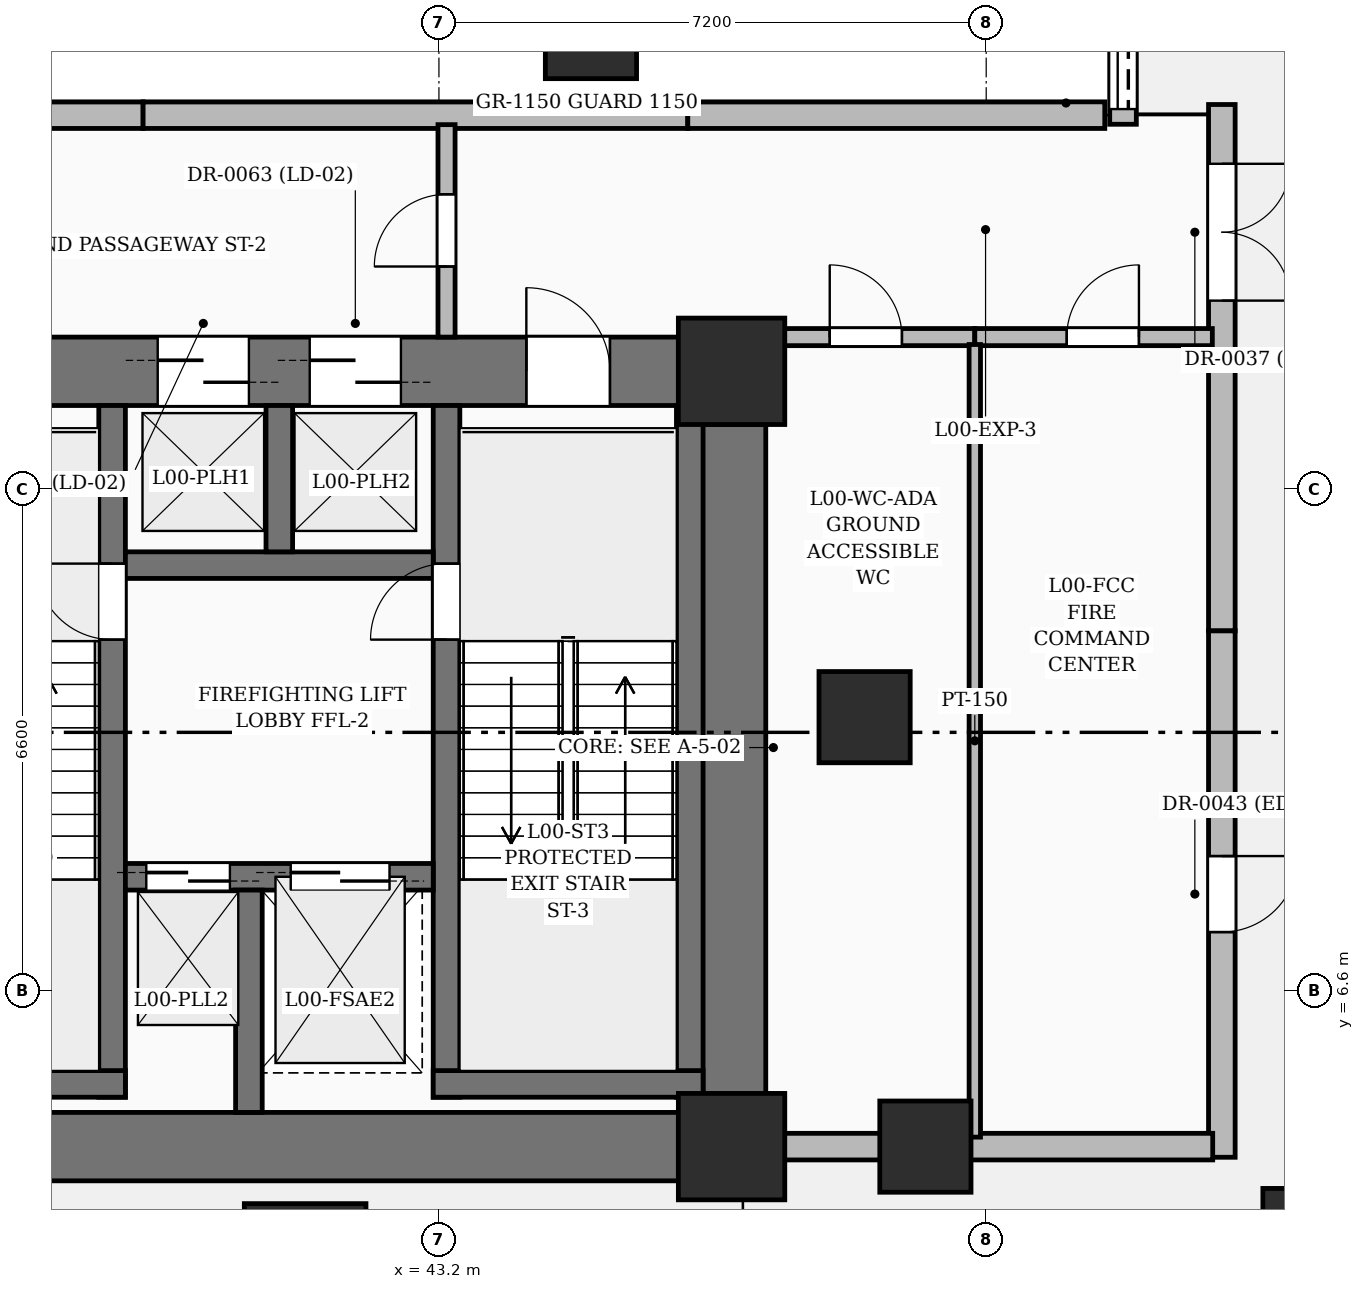
"""IFC4 building model, lengths in metres.
Left out: names, types, materials, properties, quantities, classifications, styles, units other than length and angle.
Written with IfcOpenShell. Run it as: python <this file> out.ifc"""

import sys

from ifc_helpers import new_model, si_unit, direction, frame, frame_2d, origin, origin_2d, place, context, subcontext, project, spatial, rectangle, circle, extrude, element, fill, save


model = new_model("IFC4")
c1 = context("Model", 3, precision=1e-05, world=origin(), true_north=direction((0.0, 1.0)))
c2 = subcontext(c1, "Body", "Model", "MODEL_VIEW")
j1 = project(units=[si_unit("LENGTHUNIT", "METRE"), si_unit("PLANEANGLEUNIT", "RADIAN")], contexts=[c1])
p1 = place(None, origin())
s1 = spatial("IfcSite", under=j1, at=p1, CompositionType="ELEMENT")
p2 = place(p1, origin())
s2 = spatial("IfcBuilding", under=s1, at=p2, CompositionType="ELEMENT")
p3 = place(p2, origin())
s3 = spatial("IfcBuildingStorey", under=s2, at=p3, CompositionType="ELEMENT", Elevation=0.0)
for number, where, z_axis, x_axis in (
    (1, (47.05, 4.55, 0.0), (0.0, 0.0, 1.0), (1.0, 0.0, 0.0)),
    (2, (47.05, 14.75, 0.0), (0.0, 0.0, 1.0), (1.0, 0.0, 0.0)),
):
    element("IfcColumn", number, at=place(p3, frame(where, z_axis=z_axis, x_axis=x_axis)), inside=s3, PredefinedType="COLUMN", context=c2, shape_type="SweptSolid", body=[
        extrude(rectangle(XDim=1.4, YDim=1.4, at=origin_2d()), origin(), (0.0, 0.0, 1.0), 8.4),
    ])
for number, where, z_axis, x_axis in (
    (3, (49.6, 4.55, 0.0), (0.0, 0.0, 1.0), (1.0, 0.0, 0.0)),
    (4, (48.8, 10.2, 0.0), (0.0, 0.0, 1.0), (1.0, 0.0, 0.0)),
    (5, (45.2, 19.2, 0.0), (0.0, 0.0, 1.0), (1.0, 0.0, 0.0)),
):
    element("IfcColumn", number, at=place(p3, frame(where, z_axis=z_axis, x_axis=x_axis)), inside=s3, PredefinedType="COLUMN", context=c2, shape_type="SweptSolid", body=[
        extrude(rectangle(XDim=1.2, YDim=1.2, at=origin_2d()), origin(), (0.0, 0.0, 1.0), 8.4),
    ])
p4 = place(p3, frame((35.85, 4.55, 0.0), z_axis=(0.0, 0.0, 1.0), x_axis=(1.0, 0.0, 0.0)))
e6 = element("IfcWall", 6, at=p4, inside=s3, PredefinedType="SHEAR", context=c2, shape_type="SweptSolid", body=[
    extrude(rectangle(XDim=10.5, YDim=0.9, at=frame_2d((5.25, 0.0))), origin(), (0.0, 0.0, 1.0), 8.4),
])
p5 = place(p3, frame((35.85, 14.75, 0.0), z_axis=(0.0, 0.0, 1.0), x_axis=(1.0, 0.0, 0.0)))
e7 = element("IfcWall", 7, at=p5, inside=s3, PredefinedType="SHEAR", context=c2, shape_type="SweptSolid", body=[
    extrude(rectangle(XDim=10.5, YDim=0.9, at=frame_2d((5.25, 0.0))), origin(), (0.0, 0.0, 1.0), 8.4),
])
p6 = place(p5, frame((0.9, 0.0, 0.0)))
e8 = element("IfcOpeningElement", 8, at=p6, cuts=e7, PredefinedType="OPENING", context=c2, shape_type="SweptSolid", body=[
    extrude(rectangle(XDim=1.1, YDim=2.2, at=frame_2d((0.55, 1.1))), frame((0.0, 0.46, 0.0), z_axis=(0.0, -1.0, 0.0), x_axis=(1.0, 0.0, 0.0)), (0.0, 0.0, 1.0), 0.92),
])
p7 = place(p5, frame((8.5, 0.0, 0.0)))
e9 = element("IfcOpeningElement", 9, at=p7, cuts=e7, PredefinedType="OPENING", context=c2, shape_type="SweptSolid", body=[
    extrude(rectangle(XDim=1.1, YDim=2.2, at=frame_2d((0.55, 1.1))), frame((0.0, 0.46, 0.0), z_axis=(0.0, -1.0, 0.0), x_axis=(1.0, 0.0, 0.0)), (0.0, 0.0, 1.0), 0.92),
])
p8 = place(p5, frame((3.65, 0.0, 0.0)))
e10 = element("IfcOpeningElement", 10, at=p8, cuts=e7, PredefinedType="OPENING", context=c2, shape_type="SweptSolid", body=[
    extrude(rectangle(XDim=1.2, YDim=2.2, at=frame_2d((0.6, 1.1))), frame((0.0, 0.46, 0.0), z_axis=(0.0, -1.0, 0.0), x_axis=(1.0, 0.0, 0.0)), (0.0, 0.0, 1.0), 0.92),
])
p9 = place(p5, frame((5.65, 0.0, 0.0)))
e11 = element("IfcOpeningElement", 11, at=p9, cuts=e7, PredefinedType="OPENING", context=c2, shape_type="SweptSolid", body=[
    extrude(rectangle(XDim=1.2, YDim=2.2, at=frame_2d((0.6, 1.1))), frame((0.0, 0.46, 0.0), z_axis=(0.0, -1.0, 0.0), x_axis=(1.0, 0.0, 0.0)), (0.0, 0.0, 1.0), 0.92),
])
p10 = place(p3, frame((47.05, 5.25, 0.0), z_axis=(0.0, 0.0, 1.0), x_axis=(0.0, 1.0, 0.0)))
e12 = element("IfcWall", 12, at=p10, inside=s3, PredefinedType="SHEAR", context=c2, shape_type="SweptSolid", body=[
    extrude(rectangle(XDim=8.8, YDim=0.9, at=frame_2d((4.4, 0.0))), origin(), (0.0, 0.0, 1.0), 8.4),
])
p11 = place(p3, frame((38.9, 5.2, 0.0), z_axis=(0.0, 0.0, 1.0), x_axis=(0.0, 1.0, 0.0)))
e13 = element("IfcWall", 13, at=p11, inside=s3, PredefinedType="SOLIDWALL", context=c2, shape_type="SweptSolid", body=[
    extrude(rectangle(XDim=9.1, YDim=0.35, at=frame_2d((4.55, 0.0))), origin(), (0.0, 0.0, 1.0), 8.4),
])
p12 = place(p11, frame((6.02, 0.0, 0.0)))
e14 = element("IfcOpeningElement", 14, at=p12, cuts=e13, PredefinedType="OPENING", context=c2, shape_type="SweptSolid", body=[
    extrude(rectangle(XDim=1.0, YDim=2.15, at=frame_2d((0.5, 1.075))), frame((0.0, 0.185, 0.0), z_axis=(0.0, -1.0, 0.0), x_axis=(1.0, 0.0, 0.0)), (0.0, 0.0, 1.0), 0.37),
])
p13 = place(p3, frame((35.525, 5.375, 0.0), z_axis=(0.0, 0.0, 1.0), x_axis=(1.0, 0.0, 0.0)))
e15 = element("IfcWall", 15, at=p13, inside=s3, PredefinedType="SOLIDWALL", context=c2, shape_type="SweptSolid", body=[
    extrude(rectangle(XDim=3.55, YDim=0.35, at=frame_2d((1.775, 0.0))), origin(), (0.0, 0.0, 1.0), 8.4),
])
p14 = place(p3, frame((43.3, 5.2, 0.0), z_axis=(0.0, 0.0, 1.0), x_axis=(0.0, 1.0, 0.0)))
e16 = element("IfcWall", 16, at=p14, inside=s3, PredefinedType="SOLIDWALL", context=c2, shape_type="SweptSolid", body=[
    extrude(rectangle(XDim=9.1, YDim=0.35, at=frame_2d((4.55, 0.0))), origin(), (0.0, 0.0, 1.0), 8.4),
])
p15 = place(p14, frame((6.02, 0.0, 0.0)))
e17 = element("IfcOpeningElement", 17, at=p15, cuts=e16, PredefinedType="OPENING", context=c2, shape_type="SweptSolid", body=[
    extrude(rectangle(XDim=1.0, YDim=2.15, at=frame_2d((0.5, 1.075))), frame((0.0, 0.185, 0.0), z_axis=(0.0, -1.0, 0.0), x_axis=(1.0, 0.0, 0.0)), (0.0, 0.0, 1.0), 0.37),
])
p16 = place(p3, frame((46.5, 5.2, 0.0), z_axis=(0.0, 0.0, 1.0), x_axis=(0.0, 1.0, 0.0)))
e18 = element("IfcWall", 18, at=p16, inside=s3, PredefinedType="SOLIDWALL", context=c2, shape_type="SweptSolid", body=[
    extrude(rectangle(XDim=9.1, YDim=0.35, at=frame_2d((4.55, 0.0))), origin(), (0.0, 0.0, 1.0), 8.4),
])
p17 = place(p3, frame((43.125, 5.375, 0.0), z_axis=(0.0, 0.0, 1.0), x_axis=(1.0, 0.0, 0.0)))
e19 = element("IfcWall", 19, at=p17, inside=s3, PredefinedType="SOLIDWALL", context=c2, shape_type="SweptSolid", body=[
    extrude(rectangle(XDim=3.55, YDim=0.35, at=frame_2d((1.775, 0.0))), origin(), (0.0, 0.0, 1.0), 8.4),
])
p18 = place(p3, frame((39.075, 8.1, 0.0), z_axis=(0.0, 0.0, 1.0), x_axis=(1.0, 0.0, 0.0)))
e20 = element("IfcWall", 20, at=p18, inside=s3, PredefinedType="SOLIDWALL", context=c2, shape_type="SweptSolid", body=[
    extrude(rectangle(XDim=4.05, YDim=0.35, at=frame_2d((2.025, 0.0))), origin(), (0.0, 0.0, 1.0), 8.4),
])
p19 = place(p18, frame((2.175, 0.0, 0.0)))
e21 = element("IfcOpeningElement", 21, at=p19, cuts=e20, PredefinedType="OPENING", context=c2, shape_type="SweptSolid", body=[
    extrude(rectangle(XDim=1.3, YDim=2.25, at=frame_2d((0.65, 1.125))), frame((0.0, 0.185, 0.0), z_axis=(0.0, -1.0, 0.0), x_axis=(1.0, 0.0, 0.0)), (0.0, 0.0, 1.0), 0.37),
])
p20 = place(p18, frame((0.275, 0.0, 0.0)))
e22 = element("IfcOpeningElement", 22, at=p20, cuts=e20, PredefinedType="OPENING", context=c2, shape_type="SweptSolid", body=[
    extrude(rectangle(XDim=1.1, YDim=2.2, at=frame_2d((0.55, 1.1))), frame((0.0, 0.185, 0.0), z_axis=(0.0, -1.0, 0.0), x_axis=(1.0, 0.0, 0.0)), (0.0, 0.0, 1.0), 0.37),
])
p21 = place(p3, frame((40.7, 5.0, 0.0), z_axis=(0.0, 0.0, 1.0), x_axis=(0.0, 1.0, 0.0)))
e23 = element("IfcWall", 23, at=p21, inside=s3, PredefinedType="SOLIDWALL", context=c2, shape_type="SweptSolid", body=[
    extrude(rectangle(XDim=2.925, YDim=0.35, at=frame_2d((1.462, 0.0))), origin(), (0.0, 0.0, 1.0), 8.4),
])
p22 = place(p3, frame((39.075, 12.2, 0.0), z_axis=(0.0, 0.0, 1.0), x_axis=(1.0, 0.0, 0.0)))
e24 = element("IfcWall", 24, at=p22, inside=s3, PredefinedType="SOLIDWALL", context=c2, shape_type="SweptSolid", body=[
    extrude(rectangle(XDim=4.05, YDim=0.35, at=frame_2d((2.025, 0.0))), origin(), (0.0, 0.0, 1.0), 8.4),
])
p23 = place(p3, frame((41.1, 12.375, 0.0), z_axis=(0.0, 0.0, 1.0), x_axis=(0.0, 1.0, 0.0)))
e25 = element("IfcWall", 25, at=p23, inside=s3, PredefinedType="SOLIDWALL", context=c2, shape_type="SweptSolid", body=[
    extrude(rectangle(XDim=1.925, YDim=0.35, at=frame_2d((0.962, 0.0))), origin(), (0.0, 0.0, 1.0), 8.4),
])
p24 = place(p3, frame((41.44, 3.0, 0.0), z_axis=(0.0, 0.0, 1.0), x_axis=(1.0, 0.0, 0.0)))
e26 = element("IfcColumn", 26, at=p24, inside=s3, PredefinedType="COLUMN", context=c2, shape_type="SweptSolid", body=[
    extrude(circle(Radius=0.8, at=origin_2d()), origin(), (0.0, 0.0, 1.0), 8.4),
])
p25 = place(p3, frame((55.04, 3.0, 0.0), z_axis=(0.0, 0.0, 1.0), x_axis=(1.0, 0.0, 0.0)))
e27 = element("IfcColumn", 27, at=p25, inside=s3, PredefinedType="COLUMN", context=c2, shape_type="SweptSolid", body=[
    extrude(circle(Radius=1.0, at=origin_2d()), origin(), (0.0, 0.0, 1.0), 8.4),
])
for number, where, z_axis, x_axis in (
    (28, (32.142, 18.12, 0.0), (0.0, 0.0, 1.0), (1.0, 0.0, 0.0)),
    (29, (39.308, 18.12, 0.0), (0.0, 0.0, 1.0), (1.0, 0.0, 0.0)),
):
    element("IfcWall", number, at=place(p3, frame(where, z_axis=z_axis, x_axis=x_axis)), inside=s3, PredefinedType="SOLIDWALL", context=c2, shape_type="SweptSolid", body=[
        extrude(rectangle(XDim=7.166, YDim=0.35, at=frame_2d((3.583, 0.0))), origin(), (0.0, 0.0, 1.0), 7.064),
    ])
p26 = place(p3, frame((46.474, 18.12, 0.0), z_axis=(0.0, 0.0, 1.0), x_axis=(1.0, 0.0, 0.0)))
e30 = element("IfcWall", 30, at=p26, inside=s3, PredefinedType="SOLIDWALL", context=c2, shape_type="SweptSolid", body=[
    extrude(rectangle(XDim=5.486, YDim=0.35, at=frame_2d((2.743, 0.0))), origin(), (0.0, 0.0, 1.0), 5.875),
])
p27 = place(p3, frame((53.5, 18.26, 0.0), z_axis=(0.0, 0.0, 1.0), x_axis=(0.0, -1.0, 0.0)))
e31 = element("IfcWall", 31, at=p27, inside=s3, PredefinedType="SOLIDWALL", context=c2, shape_type="SweptSolid", body=[
    extrude(rectangle(XDim=6.925, YDim=0.35, at=frame_2d((3.462, 0.0))), origin(), (0.0, 0.0, 1.0), 5.875),
])
p28 = place(p27, frame((0.78, 0.0, 0.0)))
e32 = element("IfcOpeningElement", 32, at=p28, cuts=e31, PredefinedType="OPENING", context=c2, shape_type="SweptSolid", body=[
    extrude(rectangle(XDim=1.8, YDim=2.2, at=frame_2d((0.9, 1.1))), frame((0.0, 0.185, 0.0), z_axis=(0.0, -1.0, 0.0), x_axis=(1.0, 0.0, 0.0)), (0.0, 0.0, 1.0), 0.37),
])
p29 = place(p3, frame((53.5, 11.335, 0.0), z_axis=(0.0, 0.0, 1.0), x_axis=(0.0, -1.0, 0.0)))
e33 = element("IfcWall", 33, at=p29, inside=s3, PredefinedType="SOLIDWALL", context=c2, shape_type="SweptSolid", body=[
    extrude(rectangle(XDim=6.925, YDim=0.35, at=frame_2d((3.462, 0.0))), origin(), (0.0, 0.0, 1.0), 5.875),
])
p30 = place(p29, frame((2.962, 0.0, 0.0)))
e34 = element("IfcOpeningElement", 34, at=p30, cuts=e33, PredefinedType="OPENING", context=c2, shape_type="SweptSolid", body=[
    extrude(rectangle(XDim=1.0, YDim=2.15, at=frame_2d((0.5, 1.075))), frame((0.0, 0.185, 0.0), z_axis=(0.0, -1.0, 0.0), x_axis=(1.0, 0.0, 0.0)), (0.0, 0.0, 1.0), 0.37),
])
p31 = place(p3, frame((53.38, 4.55, 0.0), z_axis=(0.0, 0.0, 1.0), x_axis=(-1.0, 0.0, 0.0)))
e35 = element("IfcWall", 35, at=p31, inside=s3, PredefinedType="SOLIDWALL", context=c2, shape_type="SweptSolid", body=[
    extrude(rectangle(XDim=3.218, YDim=0.35, at=frame_2d((1.609, 0.0))), origin(), (0.0, 0.0, 1.0), 5.875),
])
p32 = place(p3, frame((49.038, 4.55, 0.0), z_axis=(0.0, 0.0, 1.0), x_axis=(-1.0, 0.0, 0.0)))
e36 = element("IfcWall", 36, at=p32, inside=s3, PredefinedType="SOLIDWALL", context=c2, shape_type="SweptSolid", body=[
    extrude(rectangle(XDim=1.326, YDim=0.35, at=frame_2d((0.663, 0.0))), origin(), (0.0, 0.0, 1.0), 8.1),
])
p33 = place(p3, frame((52.2, 25.0, 0.0), z_axis=(0.0, 0.0, 1.0), x_axis=(0.0, -1.0, 0.0)))
e37 = element("IfcWall", 37, at=p33, inside=s3, PredefinedType="SOLIDWALL", context=c2, shape_type="SweptSolid", body=[
    extrude(rectangle(XDim=7.0, YDim=0.35, at=frame_2d((3.5, 0.0))), origin(), (0.0, 0.0, 1.0), 4.2),
])
p34 = place(p33, frame((0.2, 0.0, 0.0)))
e38 = element("IfcOpeningElement", 38, at=p34, cuts=e37, PredefinedType="OPENING", context=c2, shape_type="SweptSolid", body=[
    extrude(rectangle(XDim=6.6, YDim=2.8, at=frame_2d((3.3, 1.4))), frame((0.0, 0.185, 0.0), z_axis=(0.0, -1.0, 0.0), x_axis=(1.0, 0.0, 0.0)), (0.0, 0.0, 1.0), 0.37),
])
p35 = place(p3, frame((43.3, 15.2, 0.0), z_axis=(0.0, 0.0, 1.0), x_axis=(0.0, 1.0, 0.0)))
e39 = element("IfcWall", 39, at=p35, inside=s3, PredefinedType="PARTITIONING", context=c2, shape_type="SweptSolid", body=[
    extrude(rectangle(XDim=2.795, YDim=0.225, at=frame_2d((1.397, 0.0))), origin(), (0.0, 0.0, 1.0), 8.1),
])
p36 = place(p35, frame((0.929, 0.0, 0.0)))
e40 = element("IfcOpeningElement", 40, at=p36, cuts=e39, PredefinedType="OPENING", context=c2, shape_type="SweptSolid", body=[
    extrude(rectangle(XDim=0.95, YDim=2.15, at=frame_2d((0.475, 1.075))), frame((0.0, 0.123, 0.0), z_axis=(0.0, -1.0, 0.0), x_axis=(1.0, 0.0, 0.0)), (0.0, 0.0, 1.0), 0.245),
])
p37 = place(p3, frame((47.5, 15.2, 0.0), z_axis=(0.0, 0.0, 1.0), x_axis=(1.0, 0.0, 0.0)))
e41 = element("IfcWall", 41, at=p37, inside=s3, PredefinedType="PARTITIONING", context=c2, shape_type="SweptSolid", body=[
    extrude(rectangle(XDim=2.75, YDim=0.225, at=frame_2d((1.375, 0.0))), origin(), (0.0, 0.0, 1.0), 5.87),
])
p38 = place(p37, frame((0.842, 0.0, 0.0)))
e42 = element("IfcOpeningElement", 42, at=p38, cuts=e41, PredefinedType="OPENING", context=c2, shape_type="SweptSolid", body=[
    extrude(rectangle(XDim=0.95, YDim=2.15, at=frame_2d((0.475, 1.075))), frame((0.0, 0.123, 0.0), z_axis=(0.0, -1.0, 0.0), x_axis=(1.0, 0.0, 0.0)), (0.0, 0.0, 1.0), 0.245),
])
p39 = place(p3, frame((50.25, 15.2, 0.0), z_axis=(0.0, 0.0, 1.0), x_axis=(1.0, 0.0, 0.0)))
e43 = element("IfcWall", 43, at=p39, inside=s3, PredefinedType="PARTITIONING", context=c2, shape_type="SweptSolid", body=[
    extrude(rectangle(XDim=3.125, YDim=0.225, at=frame_2d((1.562, 0.0))), origin(), (0.0, 0.0, 1.0), 7.462),
])
p40 = place(p39, frame((1.209, 0.0, 0.0)))
e44 = element("IfcOpeningElement", 44, at=p40, cuts=e43, PredefinedType="OPENING", context=c2, shape_type="SweptSolid", body=[
    extrude(rectangle(XDim=0.95, YDim=2.15, at=frame_2d((0.475, 1.075))), frame((0.0, 0.123, 0.0), z_axis=(0.0, -1.0, 0.0), x_axis=(1.0, 0.0, 0.0)), (0.0, 0.0, 1.0), 0.245),
])
p41 = place(p3, frame((50.25, 4.675, 0.0), z_axis=(0.0, 0.0, 1.0), x_axis=(0.0, 1.0, 0.0)))
e45 = element("IfcWall", 45, at=p41, inside=s3, PredefinedType="PARTITIONING", context=c2, shape_type="SweptSolid", body=[
    extrude(rectangle(XDim=10.427, YDim=0.15, at=frame_2d((5.214, 0.0))), origin(), (0.0, 0.0, 1.0), 5.87),
])
p42 = place(p34, origin())
e46 = element("IfcDoor", 46, at=p42, inside=s3, OperationType="ROLLINGUP", PredefinedType="GATE", context=c2, shape_type="SweptSolid", body=[
    extrude(rectangle(XDim=6.6, YDim=2.8, at=frame_2d((3.3, 1.4))), frame((0.0, 0.025, 0.0), z_axis=(0.0, -1.0, 0.0), x_axis=(1.0, 0.0, 0.0)), (0.0, 0.0, 1.0), 0.05),
])
fill(e38, e46)
p43 = place(p30, origin())
e47 = element("IfcDoor", 47, at=p43, inside=s3, OperationType="SINGLE_SWING_LEFT", PredefinedType="DOOR", context=c2, shape_type="SweptSolid", body=[
    extrude(rectangle(XDim=1.0, YDim=2.15, at=frame_2d((0.5, 1.075))), frame((0.0, 0.025, 0.0), z_axis=(0.0, -1.0, 0.0), x_axis=(1.0, 0.0, 0.0)), (0.0, 0.0, 1.0), 0.05),
])
fill(e34, e47)
p44 = place(p28, origin())
e48 = element("IfcDoor", 48, at=p44, inside=s3, OperationType="DOUBLE_DOOR_SINGLE_SWING", PredefinedType="DOOR", context=c2, shape_type="SweptSolid", body=[
    extrude(rectangle(XDim=1.8, YDim=2.2, at=frame_2d((0.9, 1.1))), frame((0.0, 0.025, 0.0), z_axis=(0.0, -1.0, 0.0), x_axis=(1.0, 0.0, 0.0)), (0.0, 0.0, 1.0), 0.05),
])
fill(e32, e48)
p45 = place(p7, origin())
e49 = element("IfcDoor", 49, at=p45, inside=s3, OperationType="SINGLE_SWING_LEFT", PredefinedType="DOOR", context=c2, shape_type="SweptSolid", body=[
    extrude(rectangle(XDim=1.1, YDim=2.2, at=frame_2d((0.55, 1.1))), frame((0.0, 0.025, 0.0), z_axis=(0.0, -1.0, 0.0), x_axis=(1.0, 0.0, 0.0)), (0.0, 0.0, 1.0), 0.05),
])
fill(e9, e49)
p46 = place(p12, origin())
e50 = element("IfcDoor", 50, at=p46, inside=s3, OperationType="SINGLE_SWING_RIGHT", PredefinedType="DOOR", context=c2, shape_type="SweptSolid", body=[
    extrude(rectangle(XDim=1.0, YDim=2.15, at=frame_2d((0.5, 1.075))), frame((0.0, 0.025, 0.0), z_axis=(0.0, -1.0, 0.0), x_axis=(1.0, 0.0, 0.0)), (0.0, 0.0, 1.0), 0.05),
])
fill(e14, e50)
p47 = place(p15, origin())
e51 = element("IfcDoor", 51, at=p47, inside=s3, OperationType="SINGLE_SWING_LEFT", PredefinedType="DOOR", context=c2, shape_type="SweptSolid", body=[
    extrude(rectangle(XDim=1.0, YDim=2.15, at=frame_2d((0.5, 1.075))), frame((0.0, 0.025, 0.0), z_axis=(0.0, -1.0, 0.0), x_axis=(1.0, 0.0, 0.0)), (0.0, 0.0, 1.0), 0.05),
])
fill(e17, e51)
p48 = place(p19, origin())
e52 = element("IfcDoor", 52, at=p48, inside=s3, OperationType="DOUBLE_DOOR_SLIDING", PredefinedType="DOOR", context=c2, shape_type="SweptSolid", body=[
    extrude(rectangle(XDim=1.3, YDim=2.25, at=frame_2d((0.65, 1.125))), frame((0.0, 0.025, 0.0), z_axis=(0.0, -1.0, 0.0), x_axis=(1.0, 0.0, 0.0)), (0.0, 0.0, 1.0), 0.05),
])
fill(e21, e52)
p49 = place(p20, origin())
e53 = element("IfcDoor", 53, at=p49, inside=s3, OperationType="DOUBLE_DOOR_SLIDING", PredefinedType="DOOR", context=c2, shape_type="SweptSolid", body=[
    extrude(rectangle(XDim=1.1, YDim=2.2, at=frame_2d((0.55, 1.1))), frame((0.0, 0.025, 0.0), z_axis=(0.0, -1.0, 0.0), x_axis=(1.0, 0.0, 0.0)), (0.0, 0.0, 1.0), 0.05),
])
fill(e22, e53)
p50 = place(p8, origin())
e54 = element("IfcDoor", 54, at=p50, inside=s3, OperationType="DOUBLE_DOOR_SLIDING", PredefinedType="DOOR", context=c2, shape_type="SweptSolid", body=[
    extrude(rectangle(XDim=1.2, YDim=2.2, at=frame_2d((0.6, 1.1))), frame((0.0, 0.025, 0.0), z_axis=(0.0, -1.0, 0.0), x_axis=(1.0, 0.0, 0.0)), (0.0, 0.0, 1.0), 0.05),
])
fill(e10, e54)
p51 = place(p9, origin())
e55 = element("IfcDoor", 55, at=p51, inside=s3, OperationType="DOUBLE_DOOR_SLIDING", PredefinedType="DOOR", context=c2, shape_type="SweptSolid", body=[
    extrude(rectangle(XDim=1.2, YDim=2.2, at=frame_2d((0.6, 1.1))), frame((0.0, 0.025, 0.0), z_axis=(0.0, -1.0, 0.0), x_axis=(1.0, 0.0, 0.0)), (0.0, 0.0, 1.0), 0.05),
])
fill(e11, e55)
p52 = place(p36, origin())
e56 = element("IfcDoor", 56, at=p52, inside=s3, OperationType="SINGLE_SWING_LEFT", PredefinedType="DOOR", context=c2, shape_type="SweptSolid", body=[
    extrude(rectangle(XDim=0.95, YDim=2.15, at=frame_2d((0.475, 1.075))), frame((0.0, 0.025, 0.0), z_axis=(0.0, -1.0, 0.0), x_axis=(1.0, 0.0, 0.0)), (0.0, 0.0, 1.0), 0.05),
])
fill(e40, e56)
p53 = place(p40, origin())
e57 = element("IfcDoor", 57, at=p53, inside=s3, OperationType="SINGLE_SWING_RIGHT", PredefinedType="DOOR", context=c2, shape_type="SweptSolid", body=[
    extrude(rectangle(XDim=0.95, YDim=2.15, at=frame_2d((0.475, 1.075))), frame((0.0, 0.025, 0.0), z_axis=(0.0, -1.0, 0.0), x_axis=(1.0, 0.0, 0.0)), (0.0, 0.0, 1.0), 0.05),
])
fill(e44, e57)
p54 = place(p38, origin())
e58 = element("IfcDoor", 58, at=p54, inside=s3, OperationType="SINGLE_SWING_LEFT", PredefinedType="DOOR", context=c2, shape_type="SweptSolid", body=[
    extrude(rectangle(XDim=0.95, YDim=2.15, at=frame_2d((0.475, 1.075))), frame((0.0, 0.025, 0.0), z_axis=(0.0, -1.0, 0.0), x_axis=(1.0, 0.0, 0.0)), (0.0, 0.0, 1.0), 0.05),
])
fill(e42, e58)
save(model, sys.argv[1])
